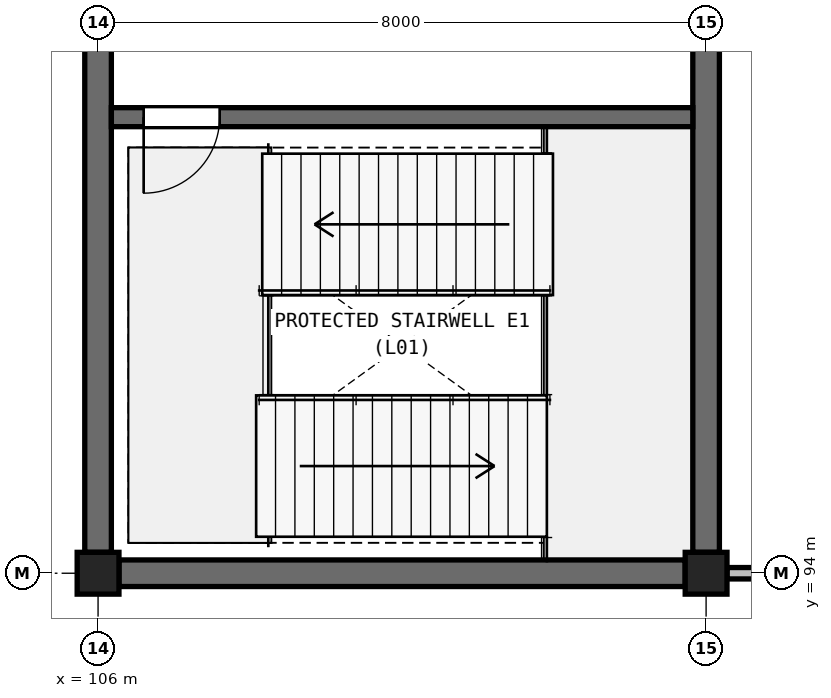
"""IFC4 building model, lengths in metres.
Left out: names, types, materials, properties, quantities, classifications, styles, units other than length and angle.
Written with IfcOpenShell. Run it as: python <this file> out.ifc"""

import sys

from ifc_helpers import new_model, si_unit, direction, frame, frame_2d, origin, origin_2d, place, context, subcontext, project, spatial, rectangle, circle, extrude, element, fill, save


model = new_model("IFC4")
c1 = context("Model", 3, precision=1e-05, world=origin(), true_north=direction((0.0, 1.0)))
c2 = subcontext(c1, "Body", "Model", "MODEL_VIEW")
j1 = project(units=[si_unit("LENGTHUNIT", "METRE"), si_unit("PLANEANGLEUNIT", "RADIAN")], contexts=[c1])
p1 = place(None, origin())
s1 = spatial("IfcSite", under=j1, at=p1, CompositionType="ELEMENT")
p2 = place(p1, origin())
s2 = spatial("IfcBuilding", under=s1, at=p2, CompositionType="ELEMENT")
p3 = place(p2, frame((0.0, 0.0, 5.4)))
s3 = spatial("IfcBuildingStorey", under=s2, at=p3, CompositionType="ELEMENT", Elevation=5.4)
for number, where, z_axis, x_axis in (
    (1, (106.0, 94.0, 0.0), (0.0, 0.0, 1.0), (1.0, 0.0, 0.0)),
    (2, (114.0, 94.0, 0.0), (0.0, 0.0, 1.0), (1.0, 0.0, 0.0)),
):
    element("IfcColumn", number, at=place(p3, frame(where, z_axis=z_axis, x_axis=x_axis)), inside=s3, PredefinedType="COLUMN", context=c2, shape_type="SweptSolid", body=[
        extrude(circle(Radius=0.275, at=origin_2d()), origin(), (0.0, 0.0, 1.0), 5.4),
    ])
for number, where, z_axis, x_axis in (
    (3, (106.275, 94.0, 0.0), (0.0, 0.0, 1.0), (1.0, 0.0, 0.0)),
    (4, (106.0, 94.275, 0.0), (0.0, 0.0, 1.0), (0.0, 1.0, 0.0)),
    (5, (114.0, 94.275, 0.0), (0.0, 0.0, 1.0), (0.0, 1.0, 0.0)),
):
    element("IfcWall", number, at=place(p3, frame(where, z_axis=z_axis, x_axis=x_axis)), inside=s3, PredefinedType="SHEAR", context=c2, shape_type="SweptSolid", body=[
        extrude(rectangle(XDim=7.45, YDim=0.35, at=frame_2d((3.725, 0.0))), origin(), (0.0, 0.0, 1.0), 5.18),
    ])
p4 = place(p3, frame((106.175, 100.0, 0.0), z_axis=(0.0, 0.0, 1.0), x_axis=(1.0, 0.0, 0.0)))
e6 = element("IfcWall", 6, at=p4, inside=s3, PredefinedType="SOLIDWALL", context=c2, shape_type="SweptSolid", body=[
    extrude(rectangle(XDim=7.65, YDim=0.25, at=frame_2d((3.825, 0.0))), origin(), (0.0, 0.0, 1.0), 5.18),
])
p5 = place(p4, frame((0.425, 0.0, 0.0)))
e7 = element("IfcOpeningElement", 7, at=p5, cuts=e6, PredefinedType="OPENING", context=c2, shape_type="SweptSolid", body=[
    extrude(rectangle(XDim=1.0, YDim=2.2, at=frame_2d((0.5, 1.1))), frame((0.0, 0.135, 0.0), z_axis=(0.0, -1.0, 0.0), x_axis=(1.0, 0.0, 0.0)), (0.0, 0.0, 1.0), 0.27),
])
p6 = place(p3, frame((114.275, 94.0, 0.0), z_axis=(0.0, 0.0, 1.0), x_axis=(1.0, 0.0, 0.0)))
e8 = element("IfcWall", 8, at=p6, inside=s3, PredefinedType="PARTITIONING", context=c2, shape_type="SweptSolid", body=[
    extrude(rectangle(XDim=7.45, YDim=0.15, at=frame_2d((3.725, 0.0))), origin(), (0.0, 0.0, 1.0), 4.49),
])
p7 = place(p6, frame((2.61, 0.0, 0.0)))
e9 = element("IfcOpeningElement", 9, at=p7, cuts=e8, PredefinedType="OPENING", context=c2, shape_type="SweptSolid", body=[
    extrude(rectangle(XDim=1.7, YDim=2.25, at=frame_2d((0.85, 1.125))), frame((0.0, 0.085, 0.0), z_axis=(0.0, -1.0, 0.0), x_axis=(1.0, 0.0, 0.0)), (0.0, 0.0, 1.0), 0.17),
])
p8 = place(p5, frame((1.0, 0.0, 0.0), z_axis=(0.0, 0.0, 1.0), x_axis=(-1.0, 0.0, 0.0)))
e10 = element("IfcDoor", 10, at=p8, inside=s3, OperationType="SINGLE_SWING_LEFT", PredefinedType="DOOR", context=c2, shape_type="SweptSolid", body=[
    extrude(rectangle(XDim=1.0, YDim=2.2, at=frame_2d((0.5, 1.1))), frame((0.0, 0.025, 0.0), z_axis=(0.0, -1.0, 0.0), x_axis=(1.0, 0.0, 0.0)), (0.0, 0.0, 1.0), 0.05),
])
fill(e7, e10)
save(model, sys.argv[1])
